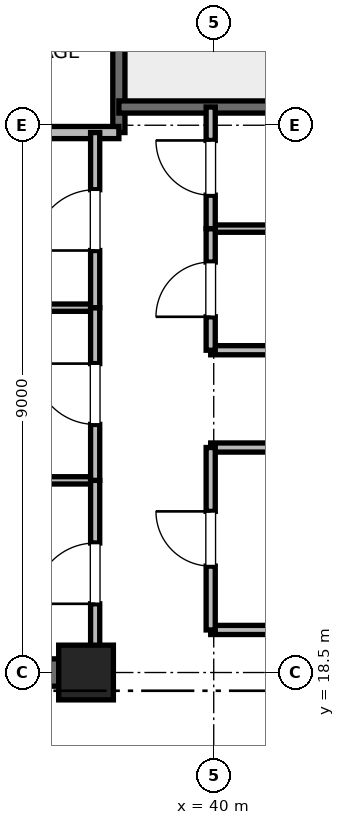
"""IFC4 building model, lengths in metres.
Left out: names, types, materials, properties, quantities, classifications, styles, units other than length and angle.
Written with IfcOpenShell. Run it as: python <this file> out.ifc"""

import sys

from ifc_helpers import new_model, si_unit, direction, frame, frame_2d, origin, origin_2d, place, context, subcontext, project, spatial, rectangle, extrude, element, fill, save


model = new_model("IFC4")
c1 = context("Model", 3, precision=1e-05, world=origin(), true_north=direction((0.0, 1.0)))
c2 = subcontext(c1, "Body", "Model", "MODEL_VIEW")
j1 = project(units=[si_unit("LENGTHUNIT", "METRE"), si_unit("PLANEANGLEUNIT", "RADIAN")], contexts=[c1])
p1 = place(None, origin())
s1 = spatial("IfcSite", under=j1, at=p1, CompositionType="ELEMENT")
p2 = place(p1, origin())
s2 = spatial("IfcBuilding", under=s1, at=p2, CompositionType="ELEMENT")
p3 = place(p2, frame((0.0, 0.0, 259.2)))
s3 = spatial("IfcBuildingStorey", under=s2, at=p3, CompositionType="ELEMENT", Elevation=259.2)
p4 = place(p3, frame((37.9, 18.5, 0.0), z_axis=(0.0, 0.0, 1.0), x_axis=(1.0, 0.0, 0.0)))
e1 = element("IfcColumn", 1, at=p4, inside=s3, PredefinedType="PILASTER", context=c2, shape_type="SweptSolid", body=[
    extrude(rectangle(XDim=0.9, YDim=0.9, at=origin_2d()), origin(), (0.0, 0.0, 1.0), 4.0),
])
p5 = place(p3, frame((29.0, 18.5, 0.0), z_axis=(0.0, 0.0, 1.0), x_axis=(1.0, 0.0, 0.0)))
e2 = element("IfcWall", 2, at=p5, inside=s3, PredefinedType="SHEAR", context=c2, shape_type="SweptSolid", body=[
    extrude(rectangle(XDim=9.2, YDim=0.45, at=frame_2d((4.6, 0.0))), origin(), (0.0, 0.0, 1.0), 3.785),
])
p6 = place(p3, frame((38.44, 27.38, 0.0), z_axis=(0.0, 0.0, 1.0), x_axis=(0.0, 1.0, 0.0)))
e3 = element("IfcWall", 3, at=p6, inside=s3, PredefinedType="SOLIDWALL", context=c2, shape_type="SweptSolid", body=[
    extrude(rectangle(XDim=8.87, YDim=0.2, at=frame_2d((4.435, 0.0))), origin(), (0.0, 0.0, 1.0), 3.785),
])
p7 = place(p3, frame((38.44, 27.8, 0.0), z_axis=(0.0, 0.0, 1.0), x_axis=(1.0, 0.0, 0.0)))
e4 = element("IfcWall", 4, at=p7, inside=s3, PredefinedType="SOLIDWALL", context=c2, shape_type="SweptSolid", body=[
    extrude(rectangle(XDim=3.32, YDim=0.2, at=frame_2d((1.66, 0.0))), origin(), (0.0, 0.0, 1.0), 3.785),
])
p8 = place(p3, frame((32.82, 27.38, 0.0), z_axis=(0.0, 0.0, 1.0), x_axis=(1.0, 0.0, 0.0)))
e5 = element("IfcWall", 5, at=p8, inside=s3, PredefinedType="PARTITIONING", context=c2, shape_type="SweptSolid", body=[
    extrude(rectangle(XDim=5.62, YDim=0.2, at=frame_2d((2.81, 0.0))), origin(), (0.0, 0.0, 1.0), 3.785),
])
for number, where, z_axis, x_axis in (
    (6, (39.95, 19.2, 0.0), (0.0, 0.0, 1.0), (1.0, 0.0, 0.0)),
    (7, (39.95, 22.2, 0.0), (0.0, 0.0, 1.0), (1.0, 0.0, 0.0)),
    (8, (39.95, 23.8, 0.0), (0.0, 0.0, 1.0), (1.0, 0.0, 0.0)),
):
    element("IfcWall", number, at=place(p3, frame(where, z_axis=z_axis, x_axis=x_axis)), inside=s3, PredefinedType="PARTITIONING", context=c2, shape_type="SweptSolid", body=[
        extrude(rectangle(XDim=1.81, YDim=0.15, at=frame_2d((0.905, 0.0))), origin(), (0.0, 0.0, 1.0), 2.85),
    ])
p9 = place(p3, frame((39.95, 25.8, 0.0), z_axis=(0.0, 0.0, 1.0), x_axis=(1.0, 0.0, 0.0)))
e9 = element("IfcWall", 9, at=p9, inside=s3, PredefinedType="PARTITIONING", context=c2, shape_type="SweptSolid", body=[
    extrude(rectangle(XDim=1.81, YDim=0.12, at=frame_2d((0.905, 0.0))), origin(), (0.0, 0.0, 1.0), 2.85),
])
p10 = place(p3, frame((39.95, 19.2, 0.0), z_axis=(0.0, 0.0, 1.0), x_axis=(0.0, 1.0, 0.0)))
e10 = element("IfcWall", 10, at=p10, inside=s3, PredefinedType="PARTITIONING", context=c2, shape_type="SweptSolid", body=[
    extrude(rectangle(XDim=3.0, YDim=0.15, at=frame_2d((1.5, 0.0))), origin(), (0.0, 0.0, 1.0), 2.85),
])
p11 = place(p10, frame((1.05, 0.0, 0.0)))
e11 = element("IfcOpeningElement", 11, at=p11, cuts=e10, PredefinedType="OPENING", context=c2, shape_type="SweptSolid", body=[
    extrude(rectangle(XDim=0.9, YDim=2.1, at=frame_2d((0.45, 1.05))), frame((0.0, 0.075, 0.0), z_axis=(0.0, -1.0, 0.0), x_axis=(1.0, 0.0, 0.0)), (0.0, 0.0, 1.0), 0.15),
])
p12 = place(p3, frame((39.95, 23.8, 0.0), z_axis=(0.0, 0.0, 1.0), x_axis=(0.0, 1.0, 0.0)))
e12 = element("IfcWall", 12, at=p12, inside=s3, PredefinedType="PARTITIONING", context=c2, shape_type="SweptSolid", body=[
    extrude(rectangle(XDim=2.0, YDim=0.15, at=frame_2d((1.0, 0.0))), origin(), (0.0, 0.0, 1.0), 2.85),
])
p13 = place(p12, frame((0.55, 0.0, 0.0)))
e13 = element("IfcOpeningElement", 13, at=p13, cuts=e12, PredefinedType="OPENING", context=c2, shape_type="SweptSolid", body=[
    extrude(rectangle(XDim=0.9, YDim=2.1, at=frame_2d((0.45, 1.05))), frame((0.0, 0.075, 0.0), z_axis=(0.0, -1.0, 0.0), x_axis=(1.0, 0.0, 0.0)), (0.0, 0.0, 1.0), 0.15),
])
p14 = place(p3, frame((39.95, 25.8, 0.0), z_axis=(0.0, 0.0, 1.0), x_axis=(0.0, 1.0, 0.0)))
e14 = element("IfcWall", 14, at=p14, inside=s3, PredefinedType="PARTITIONING", context=c2, shape_type="SweptSolid", body=[
    extrude(rectangle(XDim=2.0, YDim=0.15, at=frame_2d((1.0, 0.0))), origin(), (0.0, 0.0, 1.0), 2.85),
])
p15 = place(p14, frame((0.55, 0.0, 0.0)))
e15 = element("IfcOpeningElement", 15, at=p15, cuts=e14, PredefinedType="OPENING", context=c2, shape_type="SweptSolid", body=[
    extrude(rectangle(XDim=0.9, YDim=2.1, at=frame_2d((0.45, 1.05))), frame((0.0, 0.075, 0.0), z_axis=(0.0, -1.0, 0.0), x_axis=(1.0, 0.0, 0.0)), (0.0, 0.0, 1.0), 0.15),
])
for number, where, z_axis, x_axis in (
    (16, (32.82, 21.66, 0.0), (0.0, 0.0, 1.0), (1.0, 0.0, 0.0)),
    (17, (32.82, 24.5, 0.0), (0.0, 0.0, 1.0), (1.0, 0.0, 0.0)),
):
    element("IfcWall", number, at=place(p3, frame(where, z_axis=z_axis, x_axis=x_axis)), inside=s3, PredefinedType="PARTITIONING", context=c2, shape_type="SweptSolid", body=[
        extrude(rectangle(XDim=5.23, YDim=0.12, at=frame_2d((2.615, 0.0))), origin(), (0.0, 0.0, 1.0), 2.85),
    ])
p16 = place(p3, frame((38.05, 18.6, 0.0), z_axis=(0.0, 0.0, 1.0), x_axis=(0.0, 1.0, 0.0)))
e18 = element("IfcWall", 18, at=p16, inside=s3, PredefinedType="PARTITIONING", context=c2, shape_type="SweptSolid", body=[
    extrude(rectangle(XDim=3.06, YDim=0.15, at=frame_2d((1.53, 0.0))), origin(), (0.0, 0.0, 1.0), 2.85),
])
p17 = place(p16, frame((1.03, 0.0, 0.0)))
e19 = element("IfcOpeningElement", 19, at=p17, cuts=e18, PredefinedType="OPENING", context=c2, shape_type="SweptSolid", body=[
    extrude(rectangle(XDim=1.0, YDim=2.15, at=frame_2d((0.5, 1.075))), frame((0.0, 0.075, 0.0), z_axis=(0.0, -1.0, 0.0), x_axis=(1.0, 0.0, 0.0)), (0.0, 0.0, 1.0), 0.15),
])
p18 = place(p3, frame((38.05, 21.66, 0.0), z_axis=(0.0, 0.0, 1.0), x_axis=(0.0, 1.0, 0.0)))
e20 = element("IfcWall", 20, at=p18, inside=s3, PredefinedType="PARTITIONING", context=c2, shape_type="SweptSolid", body=[
    extrude(rectangle(XDim=2.84, YDim=0.15, at=frame_2d((1.42, 0.0))), origin(), (0.0, 0.0, 1.0), 2.85),
])
p19 = place(p18, frame((0.92, 0.0, 0.0)))
e21 = element("IfcOpeningElement", 21, at=p19, cuts=e20, PredefinedType="OPENING", context=c2, shape_type="SweptSolid", body=[
    extrude(rectangle(XDim=1.0, YDim=2.15, at=frame_2d((0.5, 1.075))), frame((0.0, 0.075, 0.0), z_axis=(0.0, -1.0, 0.0), x_axis=(1.0, 0.0, 0.0)), (0.0, 0.0, 1.0), 0.15),
])
p20 = place(p3, frame((38.05, 24.5, 0.0), z_axis=(0.0, 0.0, 1.0), x_axis=(0.0, 1.0, 0.0)))
e22 = element("IfcWall", 22, at=p20, inside=s3, PredefinedType="PARTITIONING", context=c2, shape_type="SweptSolid", body=[
    extrude(rectangle(XDim=2.88, YDim=0.15, at=frame_2d((1.44, 0.0))), origin(), (0.0, 0.0, 1.0), 2.85),
])
p21 = place(p20, frame((0.94, 0.0, 0.0)))
e23 = element("IfcOpeningElement", 23, at=p21, cuts=e22, PredefinedType="OPENING", context=c2, shape_type="SweptSolid", body=[
    extrude(rectangle(XDim=1.0, YDim=2.15, at=frame_2d((0.5, 1.075))), frame((0.0, 0.075, 0.0), z_axis=(0.0, -1.0, 0.0), x_axis=(1.0, 0.0, 0.0)), (0.0, 0.0, 1.0), 0.15),
])
p22 = place(p11, origin())
e24 = element("IfcDoor", 24, at=p22, inside=s3, OperationType="SINGLE_SWING_RIGHT", PredefinedType="DOOR", context=c2, shape_type="SweptSolid", body=[
    extrude(rectangle(XDim=0.9, YDim=2.1, at=frame_2d((0.45, 1.05))), frame((0.0, 0.025, 0.0), z_axis=(0.0, -1.0, 0.0), x_axis=(1.0, 0.0, 0.0)), (0.0, 0.0, 1.0), 0.05),
])
fill(e11, e24)
p23 = place(p13, origin())
e25 = element("IfcDoor", 25, at=p23, inside=s3, OperationType="SINGLE_SWING_LEFT", PredefinedType="DOOR", context=c2, shape_type="SweptSolid", body=[
    extrude(rectangle(XDim=0.9, YDim=2.1, at=frame_2d((0.45, 1.05))), frame((0.0, 0.025, 0.0), z_axis=(0.0, -1.0, 0.0), x_axis=(1.0, 0.0, 0.0)), (0.0, 0.0, 1.0), 0.05),
])
fill(e13, e25)
p24 = place(p15, origin())
e26 = element("IfcDoor", 26, at=p24, inside=s3, OperationType="SINGLE_SWING_RIGHT", PredefinedType="DOOR", context=c2, shape_type="SweptSolid", body=[
    extrude(rectangle(XDim=0.9, YDim=2.1, at=frame_2d((0.45, 1.05))), frame((0.0, 0.025, 0.0), z_axis=(0.0, -1.0, 0.0), x_axis=(1.0, 0.0, 0.0)), (0.0, 0.0, 1.0), 0.05),
])
fill(e15, e26)
p25 = place(p17, origin())
e27 = element("IfcDoor", 27, at=p25, inside=s3, OperationType="SINGLE_SWING_LEFT", PredefinedType="DOOR", context=c2, shape_type="SweptSolid", body=[
    extrude(rectangle(XDim=1.0, YDim=2.15, at=frame_2d((0.5, 1.075))), frame((0.0, 0.025, 0.0), z_axis=(0.0, -1.0, 0.0), x_axis=(1.0, 0.0, 0.0)), (0.0, 0.0, 1.0), 0.05),
])
fill(e19, e27)
p26 = place(p19, origin())
e28 = element("IfcDoor", 28, at=p26, inside=s3, OperationType="SINGLE_SWING_RIGHT", PredefinedType="DOOR", context=c2, shape_type="SweptSolid", body=[
    extrude(rectangle(XDim=1.0, YDim=2.15, at=frame_2d((0.5, 1.075))), frame((0.0, 0.025, 0.0), z_axis=(0.0, -1.0, 0.0), x_axis=(1.0, 0.0, 0.0)), (0.0, 0.0, 1.0), 0.05),
])
fill(e21, e28)
p27 = place(p21, origin())
e29 = element("IfcDoor", 29, at=p27, inside=s3, OperationType="SINGLE_SWING_LEFT", PredefinedType="DOOR", context=c2, shape_type="SweptSolid", body=[
    extrude(rectangle(XDim=1.0, YDim=2.15, at=frame_2d((0.5, 1.075))), frame((0.0, 0.025, 0.0), z_axis=(0.0, -1.0, 0.0), x_axis=(1.0, 0.0, 0.0)), (0.0, 0.0, 1.0), 0.05),
])
fill(e23, e29)
save(model, sys.argv[1])
